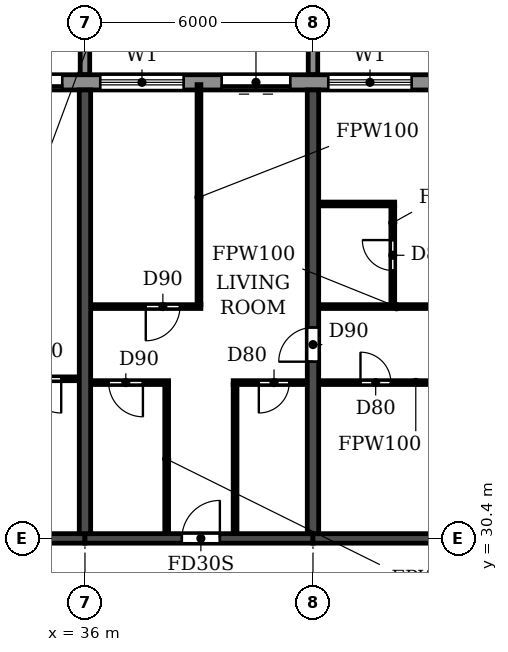
"""IFC4 building model, lengths in metres.
Left out: names, types, materials, properties, quantities, classifications, styles, units other than length and angle.
Written with IfcOpenShell. Run it as: python <this file> out.ifc"""

import sys

from ifc_helpers import new_model, si_unit, direction, frame, frame_2d, origin, place, context, subcontext, project, spatial, polyline, rectangle, outline, extrude, source, transform, mapped, element, fill, save


model = new_model("IFC4")
c1 = context("Model", 3, precision=1e-05, world=origin(), true_north=direction((0.0, 1.0)))
c2 = subcontext(c1, "Body", "Model", "MODEL_VIEW")
j1 = project(units=[si_unit("LENGTHUNIT", "METRE"), si_unit("PLANEANGLEUNIT", "RADIAN")], contexts=[c1])
p1 = place(None, origin())
s1 = spatial("IfcSite", under=j1, at=p1, CompositionType="ELEMENT")
p2 = place(p1, origin())
s2 = spatial("IfcBuilding", under=s1, at=p2, CompositionType="ELEMENT")
p3 = place(p2, frame((0.0, 0.0, 162.0)))
s3 = spatial("IfcBuildingStorey", under=s2, at=p3, CompositionType="ELEMENT", Elevation=162.0)
p4 = place(p3, frame((36.0, 30.525, 0.0), z_axis=(0.0, 0.0, 1.0), x_axis=(0.0, 1.0, 0.0)))
e1 = element("IfcWall", 1, at=p4, inside=s3, PredefinedType="SHEAR", context=c2, shape_type="SweptSolid", body=[
    extrude(rectangle(XDim=11.675, YDim=0.3, at=frame_2d((5.837, 0.0))), origin(), (0.0, 0.0, 1.0), 2.95),
])
p5 = place(p3, frame((42.0, 30.525, 0.0), z_axis=(0.0, 0.0, 1.0), x_axis=(0.0, 1.0, 0.0)))
e2 = element("IfcWall", 2, at=p5, inside=s3, PredefinedType="SHEAR", context=c2, shape_type="SweptSolid", body=[
    extrude(rectangle(XDim=11.675, YDim=0.3, at=frame_2d((5.837, 0.0))), origin(), (0.0, 0.0, 1.0), 2.95),
])
p6 = place(p5, frame((4.525, 0.0, 0.0)))
e3 = element("IfcOpeningElement", 3, at=p6, cuts=e2, PredefinedType="OPENING", context=c2, shape_type="SweptSolid", body=[
    extrude(rectangle(XDim=0.9, YDim=2.1, at=frame_2d((0.45, 1.05))), frame((0.0, 0.16, 0.0), z_axis=(0.0, -1.0, 0.0), x_axis=(1.0, 0.0, 0.0)), (0.0, 0.0, 1.0), 0.32),
])
p7 = place(p3, frame((30.0, 30.4, 0.0), z_axis=(0.0, 0.0, 1.0), x_axis=(1.0, 0.0, 0.0)))
e4 = element("IfcWall", 4, at=p7, inside=s3, PredefinedType="SHEAR", context=c2, shape_type="SweptSolid", body=[
    extrude(rectangle(XDim=6.0, YDim=0.25, at=frame_2d((3.0, 0.0))), origin(), (0.0, 0.0, 1.0), 2.35),
])
p8 = place(p7, frame((2.45, 0.0, 0.0)))
e5 = element("IfcOpeningElement", 5, at=p8, cuts=e4, PredefinedType="OPENING", context=c2, shape_type="SweptSolid", body=[
    extrude(rectangle(XDim=1.0, YDim=2.1, at=frame_2d((0.5, 1.05))), frame((0.0, 0.135, 0.0), z_axis=(0.0, -1.0, 0.0), x_axis=(1.0, 0.0, 0.0)), (0.0, 0.0, 1.0), 0.27),
])
p9 = place(p3, frame((36.0, 30.4, 0.0), z_axis=(0.0, 0.0, 1.0), x_axis=(1.0, 0.0, 0.0)))
e6 = element("IfcWall", 6, at=p9, inside=s3, PredefinedType="SHEAR", context=c2, shape_type="SweptSolid", body=[
    extrude(rectangle(XDim=6.0, YDim=0.25, at=frame_2d((3.0, 0.0))), origin(), (0.0, 0.0, 1.0), 2.35),
])
p10 = place(p9, frame((2.55, 0.0, 0.0)))
e7 = element("IfcOpeningElement", 7, at=p10, cuts=e6, PredefinedType="OPENING", context=c2, shape_type="SweptSolid", body=[
    extrude(rectangle(XDim=1.0, YDim=2.1, at=frame_2d((0.5, 1.05))), frame((0.0, 0.135, 0.0), z_axis=(0.0, -1.0, 0.0), x_axis=(1.0, 0.0, 0.0)), (0.0, 0.0, 1.0), 0.27),
])
p11 = place(p3, frame((42.0, 30.4, 0.0), z_axis=(0.0, 0.0, 1.0), x_axis=(1.0, 0.0, 0.0)))
e8 = element("IfcWall", 8, at=p11, inside=s3, PredefinedType="SHEAR", context=c2, shape_type="SweptSolid", body=[
    extrude(rectangle(XDim=6.0, YDim=0.25, at=frame_2d((3.0, 0.0))), origin(), (0.0, 0.0, 1.0), 2.35),
])
p12 = place(p3, frame((79.317, 42.4, 0.0), z_axis=(0.0, 0.0, 1.0), x_axis=(-1.0, 0.0, 0.0)))
e9 = element("IfcWall", 9, at=p12, inside=s3, PredefinedType="STANDARD", context=c2, shape_type="SweptSolid", body=[
    extrude(rectangle(XDim=56.634, YDim=0.4, at=frame_2d((28.317, 0.0))), origin(), (0.0, 0.0, 1.0), 2.95),
])
p13 = place(p12, frame((52.717, 0.0, 0.9)))
e10 = element("IfcOpeningElement", 10, at=p13, cuts=e9, PredefinedType="OPENING", context=c2, shape_type="SweptSolid", body=[
    extrude(rectangle(XDim=2.2, YDim=1.5, at=frame_2d((1.1, 0.75))), frame((0.0, 0.21, 0.0), z_axis=(0.0, -1.0, 0.0), x_axis=(1.0, 0.0, 0.0)), (0.0, 0.0, 1.0), 0.42),
])
p14 = place(p12, frame((49.917, 0.0, 0.0)))
e11 = element("IfcOpeningElement", 11, at=p14, cuts=e9, PredefinedType="OPENING", context=c2, shape_type="SweptSolid", body=[
    extrude(rectangle(XDim=1.8, YDim=2.4, at=frame_2d((0.9, 1.2))), frame((0.0, 0.21, 0.0), z_axis=(0.0, -1.0, 0.0), x_axis=(1.0, 0.0, 0.0)), (0.0, 0.0, 1.0), 0.42),
])
p15 = place(p12, frame((46.717, 0.0, 0.9)))
e12 = element("IfcOpeningElement", 12, at=p15, cuts=e9, PredefinedType="OPENING", context=c2, shape_type="SweptSolid", body=[
    extrude(rectangle(XDim=2.2, YDim=1.5, at=frame_2d((1.1, 0.75))), frame((0.0, 0.21, 0.0), z_axis=(0.0, -1.0, 0.0), x_axis=(1.0, 0.0, 0.0)), (0.0, 0.0, 1.0), 0.42),
])
p16 = place(p12, frame((43.917, 0.0, 0.0)))
e13 = element("IfcOpeningElement", 13, at=p16, cuts=e9, PredefinedType="OPENING", context=c2, shape_type="SweptSolid", body=[
    extrude(rectangle(XDim=1.8, YDim=2.4, at=frame_2d((0.9, 1.2))), frame((0.0, 0.21, 0.0), z_axis=(0.0, -1.0, 0.0), x_axis=(1.0, 0.0, 0.0)), (0.0, 0.0, 1.0), 0.42),
])
p17 = place(p12, frame((40.717, 0.0, 0.9)))
e14 = element("IfcOpeningElement", 14, at=p17, cuts=e9, PredefinedType="OPENING", context=c2, shape_type="SweptSolid", body=[
    extrude(rectangle(XDim=2.2, YDim=1.5, at=frame_2d((1.1, 0.75))), frame((0.0, 0.21, 0.0), z_axis=(0.0, -1.0, 0.0), x_axis=(1.0, 0.0, 0.0)), (0.0, 0.0, 1.0), 0.42),
])
p18 = place(p12, frame((37.917, 0.0, 0.0)))
e15 = element("IfcOpeningElement", 15, at=p18, cuts=e9, PredefinedType="OPENING", context=c2, shape_type="SweptSolid", body=[
    extrude(rectangle(XDim=1.8, YDim=2.4, at=frame_2d((0.9, 1.2))), frame((0.0, 0.21, 0.0), z_axis=(0.0, -1.0, 0.0), x_axis=(1.0, 0.0, 0.0)), (0.0, 0.0, 1.0), 0.42),
])
p19 = place(p12, frame((34.717, 0.0, 0.9)))
e16 = element("IfcOpeningElement", 16, at=p19, cuts=e9, PredefinedType="OPENING", context=c2, shape_type="SweptSolid", body=[
    extrude(rectangle(XDim=2.2, YDim=1.5, at=frame_2d((1.1, 0.75))), frame((0.0, 0.21, 0.0), z_axis=(0.0, -1.0, 0.0), x_axis=(1.0, 0.0, 0.0)), (0.0, 0.0, 1.0), 0.42),
])
p20 = place(p12, frame((31.717, 0.0, 0.9)))
e17 = element("IfcOpeningElement", 17, at=p20, cuts=e9, PredefinedType="OPENING", context=c2, shape_type="SweptSolid", body=[
    extrude(rectangle(XDim=2.2, YDim=1.5, at=frame_2d((1.1, 0.75))), frame((0.0, 0.21, 0.0), z_axis=(0.0, -1.0, 0.0), x_axis=(1.0, 0.0, 0.0)), (0.0, 0.0, 1.0), 0.42),
])
p21 = place(p12, frame((28.717, 0.0, 0.9)))
e18 = element("IfcOpeningElement", 18, at=p21, cuts=e9, PredefinedType="OPENING", context=c2, shape_type="SweptSolid", body=[
    extrude(rectangle(XDim=2.2, YDim=1.5, at=frame_2d((1.1, 0.75))), frame((0.0, 0.21, 0.0), z_axis=(0.0, -1.0, 0.0), x_axis=(1.0, 0.0, 0.0)), (0.0, 0.0, 1.0), 0.42),
])
p22 = place(p12, frame((25.717, 0.0, 0.9)))
e19 = element("IfcOpeningElement", 19, at=p22, cuts=e9, PredefinedType="OPENING", context=c2, shape_type="SweptSolid", body=[
    extrude(rectangle(XDim=2.2, YDim=1.5, at=frame_2d((1.1, 0.75))), frame((0.0, 0.21, 0.0), z_axis=(0.0, -1.0, 0.0), x_axis=(1.0, 0.0, 0.0)), (0.0, 0.0, 1.0), 0.42),
])
p23 = place(p12, frame((22.717, 0.0, 0.9)))
e20 = element("IfcOpeningElement", 20, at=p23, cuts=e9, PredefinedType="OPENING", context=c2, shape_type="SweptSolid", body=[
    extrude(rectangle(XDim=2.2, YDim=1.5, at=frame_2d((1.1, 0.75))), frame((0.0, 0.21, 0.0), z_axis=(0.0, -1.0, 0.0), x_axis=(1.0, 0.0, 0.0)), (0.0, 0.0, 1.0), 0.42),
])
p24 = place(p12, frame((19.917, 0.0, 0.0)))
e21 = element("IfcOpeningElement", 21, at=p24, cuts=e9, PredefinedType="OPENING", context=c2, shape_type="SweptSolid", body=[
    extrude(rectangle(XDim=1.8, YDim=2.4, at=frame_2d((0.9, 1.2))), frame((0.0, 0.21, 0.0), z_axis=(0.0, -1.0, 0.0), x_axis=(1.0, 0.0, 0.0)), (0.0, 0.0, 1.0), 0.42),
])
p25 = place(p12, frame((16.717, 0.0, 0.9)))
e22 = element("IfcOpeningElement", 22, at=p25, cuts=e9, PredefinedType="OPENING", context=c2, shape_type="SweptSolid", body=[
    extrude(rectangle(XDim=2.2, YDim=1.5, at=frame_2d((1.1, 0.75))), frame((0.0, 0.21, 0.0), z_axis=(0.0, -1.0, 0.0), x_axis=(1.0, 0.0, 0.0)), (0.0, 0.0, 1.0), 0.42),
])
p26 = place(p12, frame((13.717, 0.0, 0.9)))
e23 = element("IfcOpeningElement", 23, at=p26, cuts=e9, PredefinedType="OPENING", context=c2, shape_type="SweptSolid", body=[
    extrude(rectangle(XDim=2.2, YDim=1.5, at=frame_2d((1.1, 0.75))), frame((0.0, 0.21, 0.0), z_axis=(0.0, -1.0, 0.0), x_axis=(1.0, 0.0, 0.0)), (0.0, 0.0, 1.0), 0.42),
])
p27 = place(p12, frame((10.717, 0.0, 0.9)))
e24 = element("IfcOpeningElement", 24, at=p27, cuts=e9, PredefinedType="OPENING", context=c2, shape_type="SweptSolid", body=[
    extrude(rectangle(XDim=2.2, YDim=1.5, at=frame_2d((1.1, 0.75))), frame((0.0, 0.21, 0.0), z_axis=(0.0, -1.0, 0.0), x_axis=(1.0, 0.0, 0.0)), (0.0, 0.0, 1.0), 0.42),
])
p28 = place(p12, frame((7.917, 0.0, 0.0)))
e25 = element("IfcOpeningElement", 25, at=p28, cuts=e9, PredefinedType="OPENING", context=c2, shape_type="SweptSolid", body=[
    extrude(rectangle(XDim=1.8, YDim=2.4, at=frame_2d((0.9, 1.2))), frame((0.0, 0.21, 0.0), z_axis=(0.0, -1.0, 0.0), x_axis=(1.0, 0.0, 0.0)), (0.0, 0.0, 1.0), 0.42),
])
p29 = place(p12, frame((4.717, 0.0, 0.9)))
e26 = element("IfcOpeningElement", 26, at=p29, cuts=e9, PredefinedType="OPENING", context=c2, shape_type="SweptSolid", body=[
    extrude(rectangle(XDim=2.2, YDim=1.5, at=frame_2d((1.1, 0.75))), frame((0.0, 0.21, 0.0), z_axis=(0.0, -1.0, 0.0), x_axis=(1.0, 0.0, 0.0)), (0.0, 0.0, 1.0), 0.42),
])
p30 = place(p12, frame((1.917, 0.0, 0.0)))
e27 = element("IfcOpeningElement", 27, at=p30, cuts=e9, PredefinedType="OPENING", context=c2, shape_type="SweptSolid", body=[
    extrude(rectangle(XDim=1.8, YDim=2.4, at=frame_2d((0.9, 1.2))), frame((0.0, 0.21, 0.0), z_axis=(0.0, -1.0, 0.0), x_axis=(1.0, 0.0, 0.0)), (0.0, 0.0, 1.0), 0.42),
])
m1 = source(origin(), c2, "Body", "SweptSolid", [
    extrude(outline(polyline([(0.0, 0.0), (0.25, 0.0), (0.25, 3.1), (0.0, 3.1), (0.0, 0.0)])), origin(), (0.0, 0.0, 1.0), 3.1),
])
for number, where in (
    (28, (35.875, 42.6, 0.0)),
    (29, (41.875, 42.6, 0.0)),
):
    element("IfcWall", number, at=place(p3, frame(where)), inside=s3, PredefinedType="STANDARD", context=c2, shape_type="MappedRepresentation", body=[
        mapped(m1, transform((0.0, 0.0, 0.0))),
    ])
p31 = place(p3, frame((36.16, 34.5, 0.0), z_axis=(0.0, 0.0, 1.0), x_axis=(1.0, 0.0, 0.0)))
e30 = element("IfcWall", 30, at=p31, inside=s3, PredefinedType="PARTITIONING", context=c2, shape_type="SweptSolid", body=[
    extrude(rectangle(XDim=2.04, YDim=0.1, at=frame_2d((1.02, 0.0))), origin(), (0.0, 0.0, 1.0), 2.95),
])
p32 = place(p31, frame((0.465, 0.0, 0.0)))
e31 = element("IfcOpeningElement", 31, at=p32, cuts=e30, PredefinedType="OPENING", context=c2, shape_type="SweptSolid", body=[
    extrude(rectangle(XDim=0.9, YDim=2.1, at=frame_2d((0.45, 1.05))), frame((0.0, 0.06, 0.0), z_axis=(0.0, -1.0, 0.0), x_axis=(1.0, 0.0, 0.0)), (0.0, 0.0, 1.0), 0.12),
])
p33 = place(p3, frame((39.9, 34.5, 0.0), z_axis=(0.0, 0.0, 1.0), x_axis=(1.0, 0.0, 0.0)))
e32 = element("IfcWall", 32, at=p33, inside=s3, PredefinedType="PARTITIONING", context=c2, shape_type="SweptSolid", body=[
    extrude(rectangle(XDim=1.94, YDim=0.1, at=frame_2d((0.97, 0.0))), origin(), (0.0, 0.0, 1.0), 2.95),
])
p34 = place(p33, frame((0.675, 0.0, 0.0)))
e33 = element("IfcOpeningElement", 33, at=p34, cuts=e32, PredefinedType="OPENING", context=c2, shape_type="SweptSolid", body=[
    extrude(rectangle(XDim=0.8, YDim=2.1, at=frame_2d((0.4, 1.05))), frame((0.0, 0.06, 0.0), z_axis=(0.0, -1.0, 0.0), x_axis=(1.0, 0.0, 0.0)), (0.0, 0.0, 1.0), 0.12),
])
p35 = place(p3, frame((42.16, 34.5, 0.0), z_axis=(0.0, 0.0, 1.0), x_axis=(1.0, 0.0, 0.0)))
e34 = element("IfcWall", 34, at=p35, inside=s3, PredefinedType="PARTITIONING", context=c2, shape_type="SweptSolid", body=[
    extrude(rectangle(XDim=3.19, YDim=0.1, at=frame_2d((1.595, 0.0))), origin(), (0.0, 0.0, 1.0), 2.95),
])
p36 = place(p35, frame((1.09, 0.0, 0.0)))
e35 = element("IfcOpeningElement", 35, at=p36, cuts=e34, PredefinedType="OPENING", context=c2, shape_type="SweptSolid", body=[
    extrude(rectangle(XDim=0.8, YDim=2.1, at=frame_2d((0.4, 1.05))), frame((0.0, 0.06, 0.0), z_axis=(0.0, -1.0, 0.0), x_axis=(1.0, 0.0, 0.0)), (0.0, 0.0, 1.0), 0.12),
])
p37 = place(p3, frame((33.8, 34.6, 0.0), z_axis=(0.0, 0.0, 1.0), x_axis=(1.0, 0.0, 0.0)))
e36 = element("IfcWall", 36, at=p37, inside=s3, PredefinedType="PARTITIONING", context=c2, shape_type="SweptSolid", body=[
    extrude(rectangle(XDim=2.04, YDim=0.1, at=frame_2d((1.02, 0.0))), origin(), (0.0, 0.0, 1.0), 2.95),
])
p38 = place(p37, frame((0.675, 0.0, 0.0)))
e37 = element("IfcOpeningElement", 37, at=p38, cuts=e36, PredefinedType="OPENING", context=c2, shape_type="SweptSolid", body=[
    extrude(rectangle(XDim=0.9, YDim=2.1, at=frame_2d((0.45, 1.05))), frame((0.0, 0.06, 0.0), z_axis=(0.0, -1.0, 0.0), x_axis=(1.0, 0.0, 0.0)), (0.0, 0.0, 1.0), 0.12),
])
p39 = place(p3, frame((36.16, 36.5, 0.0), z_axis=(0.0, 0.0, 1.0), x_axis=(1.0, 0.0, 0.0)))
e38 = element("IfcWall", 38, at=p39, inside=s3, PredefinedType="PARTITIONING", context=c2, shape_type="SweptSolid", body=[
    extrude(rectangle(XDim=2.89, YDim=0.1, at=frame_2d((1.445, 0.0))), origin(), (0.0, 0.0, 1.0), 2.95),
])
p40 = place(p39, frame((1.44, 0.0, 0.0)))
e39 = element("IfcOpeningElement", 39, at=p40, cuts=e38, PredefinedType="OPENING", context=c2, shape_type="SweptSolid", body=[
    extrude(rectangle(XDim=0.9, YDim=2.1, at=frame_2d((0.45, 1.05))), frame((0.0, 0.06, 0.0), z_axis=(0.0, -1.0, 0.0), x_axis=(1.0, 0.0, 0.0)), (0.0, 0.0, 1.0), 0.12),
])
p41 = place(p3, frame((42.16, 36.5, 0.0), z_axis=(0.0, 0.0, 1.0), x_axis=(1.0, 0.0, 0.0)))
e40 = element("IfcWall", 40, at=p41, inside=s3, PredefinedType="PARTITIONING", context=c2, shape_type="SweptSolid", body=[
    extrude(rectangle(XDim=5.68, YDim=0.1, at=frame_2d((2.84, 0.0))), origin(), (0.0, 0.0, 1.0), 2.95),
])
p42 = place(p41, frame((4.09, 0.0, 0.0)))
e41 = element("IfcOpeningElement", 41, at=p42, cuts=e40, PredefinedType="OPENING", context=c2, shape_type="SweptSolid", body=[
    extrude(rectangle(XDim=0.9, YDim=2.1, at=frame_2d((0.45, 1.05))), frame((0.0, 0.06, 0.0), z_axis=(0.0, -1.0, 0.0), x_axis=(1.0, 0.0, 0.0)), (0.0, 0.0, 1.0), 0.12),
])
p43 = place(p3, frame((42.16, 39.2, 0.0), z_axis=(0.0, 0.0, 1.0), x_axis=(1.0, 0.0, 0.0)))
e42 = element("IfcWall", 42, at=p43, inside=s3, PredefinedType="PARTITIONING", context=c2, shape_type="SweptSolid", body=[
    extrude(rectangle(XDim=1.99, YDim=0.1, at=frame_2d((0.995, 0.0))), origin(), (0.0, 0.0, 1.0), 2.95),
])
p44 = place(p3, frame((38.15, 30.535, 0.0), z_axis=(0.0, 0.0, 1.0), x_axis=(0.0, 1.0, 0.0)))
e43 = element("IfcWall", 43, at=p44, inside=s3, PredefinedType="PARTITIONING", context=c2, shape_type="SweptSolid", body=[
    extrude(rectangle(XDim=3.915, YDim=0.1, at=frame_2d((1.958, 0.0))), origin(), (0.0, 0.0, 1.0), 2.95),
])
p45 = place(p3, frame((39.0, 36.55, 0.0), z_axis=(0.0, 0.0, 1.0), x_axis=(0.0, 1.0, 0.0)))
e44 = element("IfcWall", 44, at=p45, inside=s3, PredefinedType="PARTITIONING", context=c2, shape_type="SweptSolid", body=[
    extrude(rectangle(XDim=5.79, YDim=0.1, at=frame_2d((2.895, 0.0))), origin(), (0.0, 0.0, 1.0), 2.95),
])
p46 = place(p3, frame((39.95, 30.535, 0.0), z_axis=(0.0, 0.0, 1.0), x_axis=(0.0, 1.0, 0.0)))
e45 = element("IfcWall", 45, at=p46, inside=s3, PredefinedType="PARTITIONING", context=c2, shape_type="SweptSolid", body=[
    extrude(rectangle(XDim=3.915, YDim=0.1, at=frame_2d((1.958, 0.0))), origin(), (0.0, 0.0, 1.0), 2.95),
])
p47 = place(p3, frame((44.1, 36.55, 0.0), z_axis=(0.0, 0.0, 1.0), x_axis=(0.0, 1.0, 0.0)))
e46 = element("IfcWall", 46, at=p47, inside=s3, PredefinedType="PARTITIONING", context=c2, shape_type="SweptSolid", body=[
    extrude(rectangle(XDim=2.6, YDim=0.1, at=frame_2d((1.3, 0.0))), origin(), (0.0, 0.0, 1.0), 2.95),
])
p48 = place(p47, frame((0.9, 0.0, 0.0)))
e47 = element("IfcOpeningElement", 47, at=p48, cuts=e46, PredefinedType="OPENING", context=c2, shape_type="SweptSolid", body=[
    extrude(rectangle(XDim=0.8, YDim=2.1, at=frame_2d((0.4, 1.05))), frame((0.0, 0.06, 0.0), z_axis=(0.0, -1.0, 0.0), x_axis=(1.0, 0.0, 0.0)), (0.0, 0.0, 1.0), 0.12),
])
p49 = place(p16, origin())
e48 = element("IfcDoor", 48, at=p49, inside=s3, OperationType="DOUBLE_DOOR_SLIDING", PredefinedType="DOOR", context=c2, shape_type="SweptSolid", body=[
    extrude(rectangle(XDim=1.8, YDim=2.4, at=frame_2d((0.9, 1.2))), frame((0.0, 0.025, 0.0), z_axis=(0.0, -1.0, 0.0), x_axis=(1.0, 0.0, 0.0)), (0.0, 0.0, 1.0), 0.05),
])
fill(e13, e48)
p50 = place(p17, origin())
e49 = element("IfcWindow", 49, at=p50, inside=s3, PartitioningType="DOUBLE_PANEL_HORIZONTAL", PredefinedType="WINDOW", context=c2, shape_type="SweptSolid", body=[
    extrude(rectangle(XDim=2.2, YDim=1.5, at=frame_2d((1.1, 0.75))), frame((0.0, 0.03, 0.0), z_axis=(0.0, -1.0, 0.0), x_axis=(1.0, 0.0, 0.0)), (0.0, 0.0, 1.0), 0.06),
])
fill(e14, e49)
p51 = place(p18, origin())
e50 = element("IfcDoor", 50, at=p51, inside=s3, OperationType="DOUBLE_DOOR_SLIDING", PredefinedType="DOOR", context=c2, shape_type="SweptSolid", body=[
    extrude(rectangle(XDim=1.8, YDim=2.4, at=frame_2d((0.9, 1.2))), frame((0.0, 0.025, 0.0), z_axis=(0.0, -1.0, 0.0), x_axis=(1.0, 0.0, 0.0)), (0.0, 0.0, 1.0), 0.05),
])
fill(e15, e50)
p52 = place(p19, origin())
e51 = element("IfcWindow", 51, at=p52, inside=s3, PartitioningType="DOUBLE_PANEL_HORIZONTAL", PredefinedType="WINDOW", context=c2, shape_type="SweptSolid", body=[
    extrude(rectangle(XDim=2.2, YDim=1.5, at=frame_2d((1.1, 0.75))), frame((0.0, 0.03, 0.0), z_axis=(0.0, -1.0, 0.0), x_axis=(1.0, 0.0, 0.0)), (0.0, 0.0, 1.0), 0.06),
])
fill(e16, e51)
p53 = place(p38, frame((0.9, 0.0, 0.0), z_axis=(0.0, 0.0, 1.0), x_axis=(-1.0, 0.0, 0.0)))
e52 = element("IfcDoor", 52, at=p53, inside=s3, OperationType="SINGLE_SWING_LEFT", PredefinedType="DOOR", context=c2, shape_type="SweptSolid", body=[
    extrude(rectangle(XDim=0.9, YDim=2.1, at=frame_2d((0.45, 1.05))), frame((0.0, 0.025, 0.0), z_axis=(0.0, -1.0, 0.0), x_axis=(1.0, 0.0, 0.0)), (0.0, 0.0, 1.0), 0.05),
])
fill(e37, e52)
p54 = place(p36, origin())
e53 = element("IfcDoor", 53, at=p54, inside=s3, OperationType="SINGLE_SWING_LEFT", PredefinedType="DOOR", context=c2, shape_type="SweptSolid", body=[
    extrude(rectangle(XDim=0.8, YDim=2.1, at=frame_2d((0.4, 1.05))), frame((0.0, 0.025, 0.0), z_axis=(0.0, -1.0, 0.0), x_axis=(1.0, 0.0, 0.0)), (0.0, 0.0, 1.0), 0.05),
])
fill(e35, e53)
p55 = place(p32, frame((0.9, 0.0, 0.0), z_axis=(0.0, 0.0, 1.0), x_axis=(-1.0, 0.0, 0.0)))
e54 = element("IfcDoor", 54, at=p55, inside=s3, OperationType="SINGLE_SWING_LEFT", PredefinedType="DOOR", context=c2, shape_type="SweptSolid", body=[
    extrude(rectangle(XDim=0.9, YDim=2.1, at=frame_2d((0.45, 1.05))), frame((0.0, 0.025, 0.0), z_axis=(0.0, -1.0, 0.0), x_axis=(1.0, 0.0, 0.0)), (0.0, 0.0, 1.0), 0.05),
])
fill(e31, e54)
p56 = place(p40, frame((0.9, 0.0, 0.0), z_axis=(0.0, 0.0, 1.0), x_axis=(-1.0, 0.0, 0.0)))
e55 = element("IfcDoor", 55, at=p56, inside=s3, OperationType="SINGLE_SWING_RIGHT", PredefinedType="DOOR", context=c2, shape_type="SweptSolid", body=[
    extrude(rectangle(XDim=0.9, YDim=2.1, at=frame_2d((0.45, 1.05))), frame((0.0, 0.025, 0.0), z_axis=(0.0, -1.0, 0.0), x_axis=(1.0, 0.0, 0.0)), (0.0, 0.0, 1.0), 0.05),
])
fill(e39, e55)
p57 = place(p10, origin())
e56 = element("IfcDoor", 56, at=p57, inside=s3, OperationType="SINGLE_SWING_RIGHT", PredefinedType="DOOR", context=c2, shape_type="SweptSolid", body=[
    extrude(rectangle(XDim=1.0, YDim=2.1, at=frame_2d((0.5, 1.05))), frame((0.0, 0.025, 0.0), z_axis=(0.0, -1.0, 0.0), x_axis=(1.0, 0.0, 0.0)), (0.0, 0.0, 1.0), 0.05),
])
fill(e7, e56)
p58 = place(p34, frame((0.8, 0.0, 0.0), z_axis=(0.0, 0.0, 1.0), x_axis=(-1.0, 0.0, 0.0)))
e57 = element("IfcDoor", 57, at=p58, inside=s3, OperationType="SINGLE_SWING_RIGHT", PredefinedType="DOOR", context=c2, shape_type="SweptSolid", body=[
    extrude(rectangle(XDim=0.8, YDim=2.1, at=frame_2d((0.4, 1.05))), frame((0.0, 0.025, 0.0), z_axis=(0.0, -1.0, 0.0), x_axis=(1.0, 0.0, 0.0)), (0.0, 0.0, 1.0), 0.05),
])
fill(e33, e57)
p59 = place(p6, origin())
e58 = element("IfcDoor", 58, at=p59, inside=s3, OperationType="SINGLE_SWING_LEFT", PredefinedType="DOOR", context=c2, shape_type="SweptSolid", body=[
    extrude(rectangle(XDim=0.9, YDim=2.1, at=frame_2d((0.45, 1.05))), frame((0.0, 0.025, 0.0), z_axis=(0.0, -1.0, 0.0), x_axis=(1.0, 0.0, 0.0)), (0.0, 0.0, 1.0), 0.05),
])
fill(e3, e58)
p60 = place(p48, origin())
e59 = element("IfcDoor", 59, at=p60, inside=s3, OperationType="SINGLE_SWING_RIGHT", PredefinedType="DOOR", context=c2, shape_type="SweptSolid", body=[
    extrude(rectangle(XDim=0.8, YDim=2.1, at=frame_2d((0.4, 1.05))), frame((0.0, 0.025, 0.0), z_axis=(0.0, -1.0, 0.0), x_axis=(1.0, 0.0, 0.0)), (0.0, 0.0, 1.0), 0.05),
])
fill(e47, e59)
save(model, sys.argv[1])
